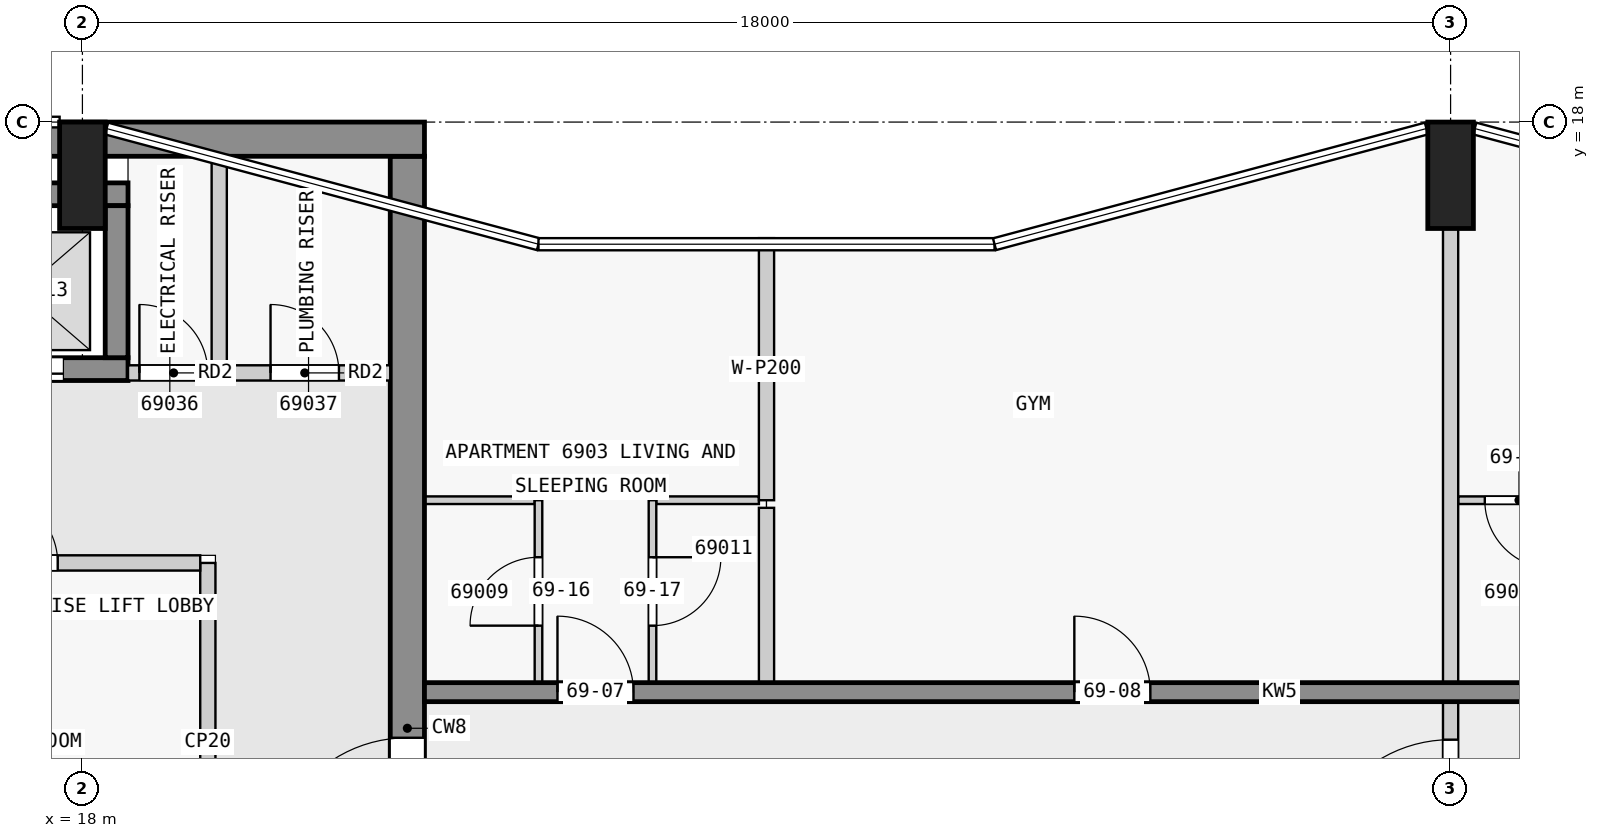
"""IFC4 building model, lengths in metres.
Left out: names, types, materials, properties, quantities, classifications, styles, units other than length and angle.
Written with IfcOpenShell. Run it as: python <this file> out.ifc"""

import sys

from ifc_helpers import new_model, si_unit, direction, frame, frame_2d, origin, origin_2d, place, context, subcontext, project, spatial, rectangle, extrude, element, fill, save


model = new_model("IFC4")
c1 = context("Model", 3, precision=1e-05, world=origin(), true_north=direction((0.0, 1.0)))
c2 = subcontext(c1, "Body", "Model", "MODEL_VIEW")
j1 = project(units=[si_unit("LENGTHUNIT", "METRE"), si_unit("PLANEANGLEUNIT", "RADIAN")], contexts=[c1])
p1 = place(None, origin())
s1 = spatial("IfcSite", under=j1, at=p1, CompositionType="ELEMENT")
p2 = place(p1, origin())
s2 = spatial("IfcBuilding", under=s1, at=p2, CompositionType="ELEMENT")
p3 = place(p2, frame((0.0, 0.0, 263.4)))
s3 = spatial("IfcBuildingStorey", under=s2, at=p3, CompositionType="ELEMENT", Elevation=263.4)
for number, where, z_axis, x_axis in (
    (1, (36.0, 17.3, 0.0), (0.0, 0.0, 1.0), (1.0, 0.0, 0.0)),
    (2, (18.0, 17.3, 0.0), (0.0, 0.0, 1.0), (1.0, 0.0, 0.0)),
):
    element("IfcColumn", number, at=place(p3, frame(where, z_axis=z_axis, x_axis=x_axis)), inside=s3, PredefinedType="COLUMN", context=c2, shape_type="SweptSolid", body=[
        extrude(rectangle(XDim=0.6, YDim=1.4, at=origin_2d()), origin(), (0.0, 0.0, 1.0), 3.5),
    ])
p4 = place(p3, frame((1.85, 17.775, 0.0), z_axis=(0.0, 0.0, 1.0), x_axis=(1.0, 0.0, 0.0)))
e3 = element("IfcWall", 3, at=p4, inside=s3, PredefinedType="SHEAR", context=c2, shape_type="SweptSolid", body=[
    extrude(rectangle(XDim=20.65, YDim=0.45, at=frame_2d((10.325, 0.0))), origin(), (0.0, 0.0, 1.0), 3.25),
])
p5 = place(p3, frame((22.275, 2.5, 0.0), z_axis=(0.0, 0.0, 1.0), x_axis=(0.0, 1.0, 0.0)))
e4 = element("IfcWall", 4, at=p5, inside=s3, PredefinedType="SHEAR", context=c2, shape_type="SweptSolid", body=[
    extrude(rectangle(XDim=15.05, YDim=0.45, at=frame_2d((7.525, 0.0))), origin(), (0.0, 0.0, 1.0), 3.25),
])
p6 = place(p5, frame((5.6, 0.0, 0.0)))
e5 = element("IfcOpeningElement", 5, at=p6, cuts=e4, PredefinedType="OPENING", context=c2, shape_type="SweptSolid", body=[
    extrude(rectangle(XDim=1.8, YDim=2.1, at=frame_2d((0.9, 1.05))), frame((0.0, 0.235, 0.0), z_axis=(0.0, -1.0, 0.0), x_axis=(1.0, 0.0, 0.0)), (0.0, 0.0, 1.0), 0.47),
])
p7 = place(p3, frame((10.8, 17.05, 0.0), z_axis=(0.0, 0.0, 1.0), x_axis=(1.0, 0.0, 0.0)))
e6 = element("IfcWall", 6, at=p7, inside=s3, PredefinedType="SHEAR", context=c2, shape_type="SweptSolid", body=[
    extrude(rectangle(XDim=7.8, YDim=0.3, at=frame_2d((3.9, 0.0))), origin(), (0.0, 0.0, 1.0), 3.25),
])
p8 = place(p3, frame((10.8, 14.75, 0.0), z_axis=(0.0, 0.0, 1.0), x_axis=(1.0, 0.0, 0.0)))
e7 = element("IfcWall", 7, at=p8, inside=s3, PredefinedType="SHEAR", context=c2, shape_type="SweptSolid", body=[
    extrude(rectangle(XDim=7.8, YDim=0.3, at=frame_2d((3.9, 0.0))), origin(), (0.0, 0.0, 1.0), 3.25),
])
p9 = place(p8, frame((0.85, 0.0, 0.0)))
e8 = element("IfcOpeningElement", 8, at=p9, cuts=e7, PredefinedType="OPENING", context=c2, shape_type="SweptSolid", body=[
    extrude(rectangle(XDim=1.1, YDim=2.1, at=frame_2d((0.55, 1.05))), frame((0.0, 0.16, 0.0), z_axis=(0.0, -1.0, 0.0), x_axis=(1.0, 0.0, 0.0)), (0.0, 0.0, 1.0), 0.32),
])
p10 = place(p8, frame((3.35, 0.0, 0.0)))
e9 = element("IfcOpeningElement", 9, at=p10, cuts=e7, PredefinedType="OPENING", context=c2, shape_type="SweptSolid", body=[
    extrude(rectangle(XDim=1.1, YDim=2.1, at=frame_2d((0.55, 1.05))), frame((0.0, 0.16, 0.0), z_axis=(0.0, -1.0, 0.0), x_axis=(1.0, 0.0, 0.0)), (0.0, 0.0, 1.0), 0.32),
])
p11 = place(p8, frame((5.85, 0.0, 0.0)))
e10 = element("IfcOpeningElement", 10, at=p11, cuts=e7, PredefinedType="OPENING", context=c2, shape_type="SweptSolid", body=[
    extrude(rectangle(XDim=1.1, YDim=2.1, at=frame_2d((0.55, 1.05))), frame((0.0, 0.16, 0.0), z_axis=(0.0, -1.0, 0.0), x_axis=(1.0, 0.0, 0.0)), (0.0, 0.0, 1.0), 0.32),
])
p12 = place(p3, frame((18.45, 14.9, 0.0), z_axis=(0.0, 0.0, 1.0), x_axis=(0.0, 1.0, 0.0)))
e11 = element("IfcWall", 11, at=p12, inside=s3, PredefinedType="SHEAR", context=c2, shape_type="SweptSolid", body=[
    extrude(rectangle(XDim=2.0, YDim=0.3, at=frame_2d((1.0, 0.0))), origin(), (0.0, 0.0, 1.0), 3.25),
])
p13 = place(p3, frame((22.5, 10.5, 0.0), z_axis=(0.0, 0.0, 1.0), x_axis=(1.0, 0.0, 0.0)))
e12 = element("IfcWall", 12, at=p13, inside=s3, PredefinedType="SHEAR", context=c2, shape_type="SweptSolid", body=[
    extrude(rectangle(XDim=22.5, YDim=0.25, at=frame_2d((11.25, 0.0))), origin(), (0.0, 0.0, 1.0), 3.25),
])
p14 = place(p13, frame((1.75, 0.0, 0.0)))
e13 = element("IfcOpeningElement", 13, at=p14, cuts=e12, PredefinedType="OPENING", context=c2, shape_type="SweptSolid", body=[
    extrude(rectangle(XDim=1.0, YDim=2.1, at=frame_2d((0.5, 1.05))), frame((0.0, 0.135, 0.0), z_axis=(0.0, -1.0, 0.0), x_axis=(1.0, 0.0, 0.0)), (0.0, 0.0, 1.0), 0.27),
])
p15 = place(p13, frame((8.55, 0.0, 0.0)))
e14 = element("IfcOpeningElement", 14, at=p15, cuts=e12, PredefinedType="OPENING", context=c2, shape_type="SweptSolid", body=[
    extrude(rectangle(XDim=1.0, YDim=2.1, at=frame_2d((0.5, 1.05))), frame((0.0, 0.135, 0.0), z_axis=(0.0, -1.0, 0.0), x_axis=(1.0, 0.0, 0.0)), (0.0, 0.0, 1.0), 0.27),
])
p16 = place(p13, frame((16.85, 0.0, 0.0)))
e15 = element("IfcOpeningElement", 15, at=p16, cuts=e12, PredefinedType="OPENING", context=c2, shape_type="SweptSolid", body=[
    extrude(rectangle(XDim=1.0, YDim=2.1, at=frame_2d((0.5, 1.05))), frame((0.0, 0.135, 0.0), z_axis=(0.0, -1.0, 0.0), x_axis=(1.0, 0.0, 0.0)), (0.0, 0.0, 1.0), 0.27),
])
p17 = place(p3, frame((19.65, 7.5, 0.0), z_axis=(0.0, 0.0, 1.0), x_axis=(0.0, 1.0, 0.0)))
e16 = element("IfcWall", 16, at=p17, inside=s3, PredefinedType="PARTITIONING", context=c2, shape_type="SweptSolid", body=[
    extrude(rectangle(XDim=4.7, YDim=0.2, at=frame_2d((2.35, 0.0))), origin(), (0.0, 0.0, 1.0), 3.25),
])
p18 = place(p3, frame((10.9, 12.2, 0.0), z_axis=(0.0, 0.0, 1.0), x_axis=(1.0, 0.0, 0.0)))
e17 = element("IfcWall", 17, at=p18, inside=s3, PredefinedType="PARTITIONING", context=c2, shape_type="SweptSolid", body=[
    extrude(rectangle(XDim=8.65, YDim=0.2, at=frame_2d((4.325, 0.0))), origin(), (0.0, 0.0, 1.0), 3.25),
])
p19 = place(p18, frame((1.45, 0.0, 0.0)))
e18 = element("IfcOpeningElement", 18, at=p19, cuts=e17, PredefinedType="OPENING", context=c2, shape_type="SweptSolid", body=[
    extrude(rectangle(XDim=0.9, YDim=2.1, at=frame_2d((0.45, 1.05))), frame((0.0, 0.11, 0.0), z_axis=(0.0, -1.0, 0.0), x_axis=(1.0, 0.0, 0.0)), (0.0, 0.0, 1.0), 0.22),
])
p20 = place(p18, frame((5.875, 0.0, 0.0)))
e19 = element("IfcOpeningElement", 19, at=p20, cuts=e17, PredefinedType="OPENING", context=c2, shape_type="SweptSolid", body=[
    extrude(rectangle(XDim=0.9, YDim=2.1, at=frame_2d((0.45, 1.05))), frame((0.0, 0.11, 0.0), z_axis=(0.0, -1.0, 0.0), x_axis=(1.0, 0.0, 0.0)), (0.0, 0.0, 1.0), 0.22),
])
p21 = place(p3, frame((18.6, 14.7, 0.0), z_axis=(0.0, 0.0, 1.0), x_axis=(1.0, 0.0, 0.0)))
e20 = element("IfcWall", 20, at=p21, inside=s3, PredefinedType="PARTITIONING", context=c2, shape_type="SweptSolid", body=[
    extrude(rectangle(XDim=3.45, YDim=0.2, at=frame_2d((1.725, 0.0))), origin(), (0.0, 0.0, 1.0), 3.25),
])
p22 = place(p21, frame((0.15, 0.0, 0.0)))
e21 = element("IfcOpeningElement", 21, at=p22, cuts=e20, PredefinedType="OPENING", context=c2, shape_type="SweptSolid", body=[
    extrude(rectangle(XDim=0.9, YDim=2.1, at=frame_2d((0.45, 1.05))), frame((0.0, 0.11, 0.0), z_axis=(0.0, -1.0, 0.0), x_axis=(1.0, 0.0, 0.0)), (0.0, 0.0, 1.0), 0.22),
])
p23 = place(p21, frame((1.875, 0.0, 0.0)))
e22 = element("IfcOpeningElement", 22, at=p23, cuts=e20, PredefinedType="OPENING", context=c2, shape_type="SweptSolid", body=[
    extrude(rectangle(XDim=0.9, YDim=2.1, at=frame_2d((0.45, 1.05))), frame((0.0, 0.11, 0.0), z_axis=(0.0, -1.0, 0.0), x_axis=(1.0, 0.0, 0.0)), (0.0, 0.0, 1.0), 0.22),
])
p24 = place(p3, frame((19.8, 14.8, 0.0), z_axis=(0.0, 0.0, 1.0), x_axis=(0.0, 1.0, 0.0)))
e23 = element("IfcWall", 23, at=p24, inside=s3, PredefinedType="PARTITIONING", context=c2, shape_type="SweptSolid", body=[
    extrude(rectangle(XDim=2.75, YDim=0.2, at=frame_2d((1.375, 0.0))), origin(), (0.0, 0.0, 1.0), 3.25),
])
p25 = place(p3, frame((23.95, 13.025, 0.0), z_axis=(0.0, 0.0, 1.0), x_axis=(-1.0, 0.0, 0.0)))
e24 = element("IfcWall", 24, at=p25, inside=s3, PredefinedType="PARTITIONING", context=c2, shape_type="SweptSolid", body=[
    extrude(rectangle(XDim=1.45, YDim=0.1, at=frame_2d((0.725, 0.0))), origin(), (0.0, 0.0, 1.0), 3.25),
])
p26 = place(p3, frame((26.9, 13.025, 0.0), z_axis=(0.0, 0.0, 1.0), x_axis=(-1.0, 0.0, 0.0)))
e25 = element("IfcWall", 25, at=p26, inside=s3, PredefinedType="PARTITIONING", context=c2, shape_type="SweptSolid", body=[
    extrude(rectangle(XDim=1.35, YDim=0.1, at=frame_2d((0.675, 0.0))), origin(), (0.0, 0.0, 1.0), 3.25),
])
p27 = place(p3, frame((39.1, 13.025, 0.0), z_axis=(0.0, 0.0, 1.0), x_axis=(-1.0, 0.0, 0.0)))
e26 = element("IfcWall", 26, at=p27, inside=s3, PredefinedType="PARTITIONING", context=c2, shape_type="SweptSolid", body=[
    extrude(rectangle(XDim=3.0, YDim=0.1, at=frame_2d((1.5, 0.0))), origin(), (0.0, 0.0, 1.0), 3.25),
])
p28 = place(p27, frame((1.75, 0.0, 0.0)))
e27 = element("IfcOpeningElement", 27, at=p28, cuts=e26, PredefinedType="OPENING", context=c2, shape_type="SweptSolid", body=[
    extrude(rectangle(XDim=0.9, YDim=2.1, at=frame_2d((0.45, 1.05))), frame((0.0, 0.06, 0.0), z_axis=(0.0, -1.0, 0.0), x_axis=(1.0, 0.0, 0.0)), (0.0, 0.0, 1.0), 0.12),
])
p29 = place(p3, frame((24.0, 10.625, 0.0), z_axis=(0.0, 0.0, 1.0), x_axis=(0.0, 1.0, 0.0)))
e28 = element("IfcWall", 28, at=p29, inside=s3, PredefinedType="PARTITIONING", context=c2, shape_type="SweptSolid", body=[
    extrude(rectangle(XDim=2.4, YDim=0.1, at=frame_2d((1.2, 0.0))), origin(), (0.0, 0.0, 1.0), 3.25),
])
p30 = place(p29, frame((0.75, 0.0, 0.0)))
e29 = element("IfcOpeningElement", 29, at=p30, cuts=e28, PredefinedType="OPENING", context=c2, shape_type="SweptSolid", body=[
    extrude(rectangle(XDim=0.9, YDim=2.1, at=frame_2d((0.45, 1.05))), frame((0.0, 0.06, 0.0), z_axis=(0.0, -1.0, 0.0), x_axis=(1.0, 0.0, 0.0)), (0.0, 0.0, 1.0), 0.12),
])
p31 = place(p3, frame((25.5, 13.025, 0.0), z_axis=(0.0, 0.0, 1.0), x_axis=(0.0, -1.0, 0.0)))
e30 = element("IfcWall", 30, at=p31, inside=s3, PredefinedType="PARTITIONING", context=c2, shape_type="SweptSolid", body=[
    extrude(rectangle(XDim=2.4, YDim=0.1, at=frame_2d((1.2, 0.0))), origin(), (0.0, 0.0, 1.0), 3.25),
])
p32 = place(p31, frame((0.75, 0.0, 0.0)))
e31 = element("IfcOpeningElement", 31, at=p32, cuts=e30, PredefinedType="OPENING", context=c2, shape_type="SweptSolid", body=[
    extrude(rectangle(XDim=0.9, YDim=2.1, at=frame_2d((0.45, 1.05))), frame((0.0, 0.06, 0.0), z_axis=(0.0, -1.0, 0.0), x_axis=(1.0, 0.0, 0.0)), (0.0, 0.0, 1.0), 0.12),
])
p33 = place(p3, frame((27.0, 16.473, 0.0), z_axis=(0.0, 0.0, 1.0), x_axis=(0.0, -1.0, 0.0)))
e32 = element("IfcWall", 32, at=p33, inside=s3, PredefinedType="PARTITIONING", context=c2, shape_type="SweptSolid", body=[
    extrude(rectangle(XDim=3.448, YDim=0.2, at=frame_2d((1.724, 0.0))), origin(), (0.0, 0.0, 1.0), 3.25),
])
p34 = place(p3, frame((27.0, 10.625, 0.0), z_axis=(0.0, 0.0, 1.0), x_axis=(0.0, 1.0, 0.0)))
e33 = element("IfcWall", 33, at=p34, inside=s3, PredefinedType="PARTITIONING", context=c2, shape_type="SweptSolid", body=[
    extrude(rectangle(XDim=2.3, YDim=0.2, at=frame_2d((1.15, 0.0))), origin(), (0.0, 0.0, 1.0), 3.25),
])
p35 = place(p3, frame((36.0, 10.625, 0.0), z_axis=(0.0, 0.0, 1.0), x_axis=(0.0, 1.0, 0.0)))
e34 = element("IfcWall", 34, at=p35, inside=s3, PredefinedType="PARTITIONING", context=c2, shape_type="SweptSolid", body=[
    extrude(rectangle(XDim=5.975, YDim=0.2, at=frame_2d((2.988, 0.0))), origin(), (0.0, 0.0, 1.0), 3.25),
])
p36 = place(p3, frame((36.0, 7.475, 0.0), z_axis=(0.0, 0.0, 1.0), x_axis=(0.0, 1.0, 0.0)))
e35 = element("IfcWall", 35, at=p36, inside=s3, PredefinedType="PARTITIONING", context=c2, shape_type="SweptSolid", body=[
    extrude(rectangle(XDim=3.05, YDim=0.2, at=frame_2d((1.525, 0.0))), origin(), (0.0, 0.0, 1.0), 3.25),
])
p37 = place(p36, frame((0.6, 0.0, 0.0)))
e36 = element("IfcOpeningElement", 36, at=p37, cuts=e35, PredefinedType="OPENING", context=c2, shape_type="SweptSolid", body=[
    extrude(rectangle(XDim=1.8, YDim=2.1, at=frame_2d((0.9, 1.05))), frame((0.0, 0.11, 0.0), z_axis=(0.0, -1.0, 0.0), x_axis=(1.0, 0.0, 0.0)), (0.0, 0.0, 1.0), 0.22),
])
p38 = place(p20, origin())
e37 = element("IfcDoor", 37, at=p38, inside=s3, OperationType="SINGLE_SWING_LEFT", PredefinedType="DOOR", context=c2, shape_type="SweptSolid", body=[
    extrude(rectangle(XDim=0.9, YDim=2.1, at=frame_2d((0.45, 1.05))), frame((0.0, 0.025, 0.0), z_axis=(0.0, -1.0, 0.0), x_axis=(1.0, 0.0, 0.0)), (0.0, 0.0, 1.0), 0.05),
])
fill(e19, e37)
p39 = place(p11, origin())
e38 = element("IfcDoor", 38, at=p39, inside=s3, OperationType="DOUBLE_DOOR_SLIDING", PredefinedType="DOOR", context=c2, shape_type="SweptSolid", body=[
    extrude(rectangle(XDim=1.1, YDim=2.1, at=frame_2d((0.55, 1.05))), frame((0.0, 0.025, 0.0), z_axis=(0.0, -1.0, 0.0), x_axis=(1.0, 0.0, 0.0)), (0.0, 0.0, 1.0), 0.05),
])
fill(e10, e38)
p40 = place(p6, origin())
e39 = element("IfcDoor", 39, at=p40, inside=s3, OperationType="DOUBLE_DOOR_SINGLE_SWING", PredefinedType="DOOR", context=c2, shape_type="SweptSolid", body=[
    extrude(rectangle(XDim=1.8, YDim=2.1, at=frame_2d((0.9, 1.05))), frame((0.0, 0.025, 0.0), z_axis=(0.0, -1.0, 0.0), x_axis=(1.0, 0.0, 0.0)), (0.0, 0.0, 1.0), 0.05),
])
fill(e5, e39)
p41 = place(p22, origin())
e40 = element("IfcDoor", 40, at=p41, inside=s3, OperationType="SINGLE_SWING_LEFT", PredefinedType="DOOR", context=c2, shape_type="SweptSolid", body=[
    extrude(rectangle(XDim=0.9, YDim=2.1, at=frame_2d((0.45, 1.05))), frame((0.0, 0.025, 0.0), z_axis=(0.0, -1.0, 0.0), x_axis=(1.0, 0.0, 0.0)), (0.0, 0.0, 1.0), 0.05),
])
fill(e21, e40)
p42 = place(p23, origin())
e41 = element("IfcDoor", 41, at=p42, inside=s3, OperationType="SINGLE_SWING_LEFT", PredefinedType="DOOR", context=c2, shape_type="SweptSolid", body=[
    extrude(rectangle(XDim=0.9, YDim=2.1, at=frame_2d((0.45, 1.05))), frame((0.0, 0.025, 0.0), z_axis=(0.0, -1.0, 0.0), x_axis=(1.0, 0.0, 0.0)), (0.0, 0.0, 1.0), 0.05),
])
fill(e22, e41)
p43 = place(p14, origin())
e42 = element("IfcDoor", 42, at=p43, inside=s3, OperationType="SINGLE_SWING_LEFT", PredefinedType="DOOR", context=c2, shape_type="SweptSolid", body=[
    extrude(rectangle(XDim=1.0, YDim=2.1, at=frame_2d((0.5, 1.05))), frame((0.0, 0.025, 0.0), z_axis=(0.0, -1.0, 0.0), x_axis=(1.0, 0.0, 0.0)), (0.0, 0.0, 1.0), 0.05),
])
fill(e13, e42)
p44 = place(p15, origin())
e43 = element("IfcDoor", 43, at=p44, inside=s3, OperationType="SINGLE_SWING_LEFT", PredefinedType="DOOR", context=c2, shape_type="SweptSolid", body=[
    extrude(rectangle(XDim=1.0, YDim=2.1, at=frame_2d((0.5, 1.05))), frame((0.0, 0.025, 0.0), z_axis=(0.0, -1.0, 0.0), x_axis=(1.0, 0.0, 0.0)), (0.0, 0.0, 1.0), 0.05),
])
fill(e14, e43)
p45 = place(p37, origin())
e44 = element("IfcDoor", 44, at=p45, inside=s3, OperationType="SINGLE_SWING_LEFT", PredefinedType="DOOR", context=c2, shape_type="SweptSolid", body=[
    extrude(rectangle(XDim=1.8, YDim=2.1, at=frame_2d((0.9, 1.05))), frame((0.0, 0.025, 0.0), z_axis=(0.0, -1.0, 0.0), x_axis=(1.0, 0.0, 0.0)), (0.0, 0.0, 1.0), 0.05),
])
fill(e36, e44)
p46 = place(p30, origin())
e45 = element("IfcDoor", 45, at=p46, inside=s3, OperationType="SINGLE_SWING_LEFT", PredefinedType="DOOR", context=c2, shape_type="SweptSolid", body=[
    extrude(rectangle(XDim=0.9, YDim=2.1, at=frame_2d((0.45, 1.05))), frame((0.0, 0.025, 0.0), z_axis=(0.0, -1.0, 0.0), x_axis=(1.0, 0.0, 0.0)), (0.0, 0.0, 1.0), 0.05),
])
fill(e29, e45)
p47 = place(p32, origin())
e46 = element("IfcDoor", 46, at=p47, inside=s3, OperationType="SINGLE_SWING_LEFT", PredefinedType="DOOR", context=c2, shape_type="SweptSolid", body=[
    extrude(rectangle(XDim=0.9, YDim=2.1, at=frame_2d((0.45, 1.05))), frame((0.0, 0.025, 0.0), z_axis=(0.0, -1.0, 0.0), x_axis=(1.0, 0.0, 0.0)), (0.0, 0.0, 1.0), 0.05),
])
fill(e31, e46)
p48 = place(p28, origin())
e47 = element("IfcDoor", 47, at=p48, inside=s3, OperationType="SINGLE_SWING_RIGHT", PredefinedType="DOOR", context=c2, shape_type="SweptSolid", body=[
    extrude(rectangle(XDim=0.9, YDim=2.1, at=frame_2d((0.45, 1.05))), frame((0.0, 0.025, 0.0), z_axis=(0.0, -1.0, 0.0), x_axis=(1.0, 0.0, 0.0)), (0.0, 0.0, 1.0), 0.05),
])
fill(e27, e47)
save(model, sys.argv[1])
